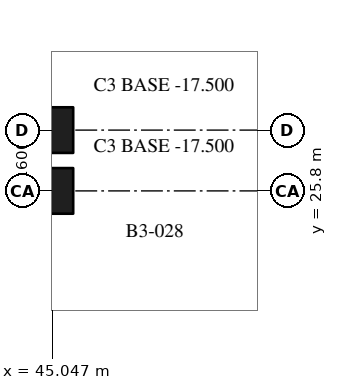
"""IFC4 building model, lengths in metres.
Left out: names, types, materials, properties, quantities, classifications, styles, units other than length and angle.
Written with IfcOpenShell. Run it as: python <this file> out.ifc"""

import sys

from ifc_helpers import new_model, si_unit, direction, frame, origin, origin_2d, place, context, subcontext, project, spatial, rectangle, extrude, element, save


model = new_model("IFC4")
c1 = context("Model", 3, precision=1e-05, world=origin(), true_north=direction((0.0, 1.0)))
c2 = subcontext(c1, "Body", "Model", "MODEL_VIEW")
j1 = project(units=[si_unit("LENGTHUNIT", "METRE"), si_unit("PLANEANGLEUNIT", "RADIAN")], contexts=[c1])
p1 = place(None, origin())
s1 = spatial("IfcSite", under=j1, at=p1, CompositionType="ELEMENT")
p2 = place(p1, origin())
s2 = spatial("IfcBuilding", under=s1, at=p2, CompositionType="ELEMENT")
p3 = place(p2, frame((0.0, 0.0, -17.0)))
s3 = spatial("IfcBuildingStorey", under=s2, at=p3, CompositionType="ELEMENT", Elevation=-17.0)
for number, where, z_axis, x_axis in (
    (1, (45.0, 25.8, -0.5), (0.0, 0.0, 1.0), (1.0, 0.0, 0.0)),
    (2, (45.0, 27.4, -0.5), (0.0, 0.0, 1.0), (1.0, 0.0, 0.0)),
):
    element("IfcColumn", number, at=place(p3, frame(where, z_axis=z_axis, x_axis=x_axis)), inside=s3, PredefinedType="COLUMN", context=c2, shape_type="SweptSolid", body=[
        extrude(rectangle(XDim=1.2, YDim=1.2, at=origin_2d()), origin(), (0.0, 0.0, 1.0), 5.5),
    ])
save(model, sys.argv[1])
